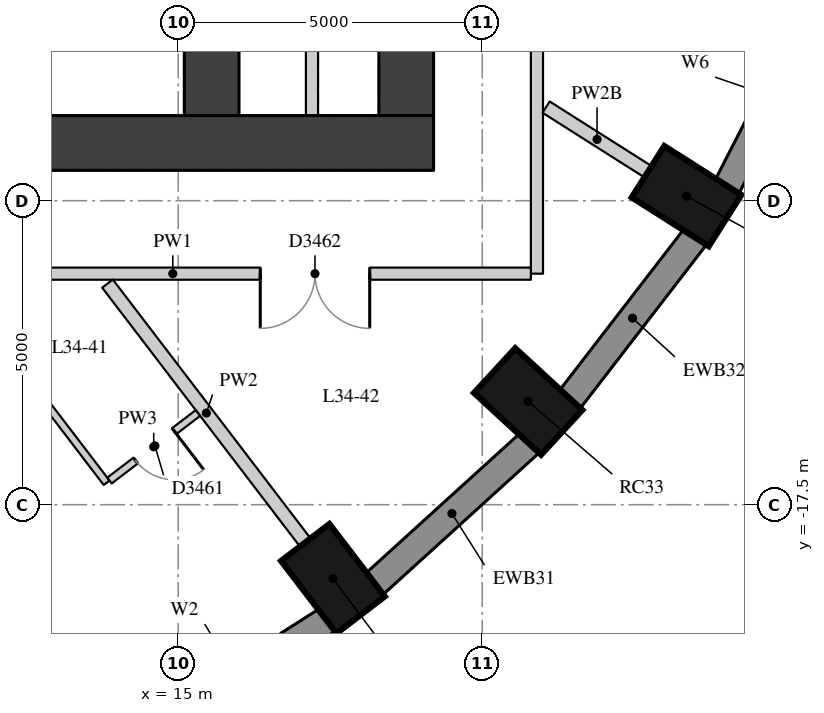
"""IFC4 building model, lengths in metres.
Left out: names, types, materials, properties, quantities, classifications, styles, units other than length and angle.
Written with IfcOpenShell. Run it as: python <this file> out.ifc"""

import sys

from ifc_helpers import new_model, si_unit, direction, frame, frame_2d, origin, origin_2d, place, context, subcontext, project, spatial, rectangle, extrude, element, fill, save


model = new_model("IFC4")
c1 = context("Model", 3, precision=1e-05, world=origin(), true_north=direction((0.0, 1.0)))
c2 = subcontext(c1, "Body", "Model", "MODEL_VIEW")
j1 = project(units=[si_unit("LENGTHUNIT", "METRE"), si_unit("PLANEANGLEUNIT", "RADIAN")], contexts=[c1])
p1 = place(None, origin())
s1 = spatial("IfcSite", under=j1, at=p1, CompositionType="ELEMENT")
p2 = place(p1, origin())
s2 = spatial("IfcBuilding", under=s1, at=p2, CompositionType="ELEMENT")
p3 = place(p2, frame((0.0, 0.0, 121.9)))
s3 = spatial("IfcBuildingStorey", under=s2, at=p3, CompositionType="ELEMENT", Elevation=121.9)
for number, where, z_axis, x_axis in (
    (1, (17.545, -18.717, 0.0), (0.0, 0.0, 1.0), (0.607, -0.795, 0.0)),
    (2, (20.755, -15.802, 0.0), (0.0, 0.0, 1.0), (0.735, -0.678, 0.0)),
    (3, (23.36, -12.425, 0.0), (0.0, 0.0, 1.0), (0.845, -0.536, 0.0)),
):
    element("IfcColumn", number, at=place(p3, frame(where, z_axis=z_axis, x_axis=x_axis)), inside=s3, PredefinedType="COLUMN", context=c2, shape_type="SweptSolid", body=[
        extrude(rectangle(XDim=1.5, YDim=1.0, at=origin_2d()), origin(), (0.0, 0.0, 1.0), 3.3),
    ])
p4 = place(p3, frame((14.475, -21.287, 0.0), z_axis=(0.0, 0.0, 1.0), x_axis=(0.843911841423, 0.536481876587, 0.0)))
e4 = element("IfcWall", 4, at=p4, inside=s3, PredefinedType="SOLIDWALL", context=c2, shape_type="SweptSolid", body=[
    extrude(rectangle(XDim=3.532, YDim=0.45, at=frame_2d((1.766, 0.0))), origin(), (0.0, 0.0, 1.0), 3.02),
])
p5 = place(p4, frame((0.766, 0.0, 0.4)))
e5 = element("IfcOpeningElement", 5, at=p5, cuts=e4, PredefinedType="OPENING", context=c2, shape_type="SweptSolid", body=[
    extrude(rectangle(XDim=2.0, YDim=1.75, at=frame_2d((1.0, 0.875))), frame((0.0, 0.235, 0.0), z_axis=(0.0, -1.0, 0.0), x_axis=(1.0, 0.0, 0.0)), (0.0, 0.0, 1.0), 0.47),
])
p6 = place(p3, frame((18.219, -18.81, 0.0), z_axis=(0.0, 0.0, 1.0), x_axis=(0.740364106106, 0.672206062446, 0.0)))
e6 = element("IfcWall", 6, at=p6, inside=s3, PredefinedType="SOLIDWALL", context=c2, shape_type="SweptSolid", body=[
    extrude(rectangle(XDim=3.464, YDim=0.45, at=frame_2d((1.732, 0.0))), origin(), (0.0, 0.0, 1.0), 3.02),
])
p7 = place(p3, frame((21.435, -15.775, 0.0), z_axis=(0.0, 0.0, 1.0), x_axis=(0.610693945156, 0.791866721961, 0.0)))
e7 = element("IfcWall", 7, at=p7, inside=s3, PredefinedType="SOLIDWALL", context=c2, shape_type="SweptSolid", body=[
    extrude(rectangle(XDim=3.395, YDim=0.45, at=frame_2d((1.697, 0.0))), origin(), (0.0, 0.0, 1.0), 3.02),
])
p8 = place(p3, frame((24.023, -12.277, 0.0), z_axis=(0.0, 0.0, 1.0), x_axis=(0.456828186229, 0.889554949549, 0.0)))
e8 = element("IfcWall", 8, at=p8, inside=s3, PredefinedType="SOLIDWALL", context=c2, shape_type="SweptSolid", body=[
    extrude(rectangle(XDim=3.333, YDim=0.45, at=frame_2d((1.667, 0.0))), origin(), (0.0, 0.0, 1.0), 3.02),
])
p9 = place(p8, frame((1.366, 0.0, 0.4)))
e9 = element("IfcOpeningElement", 9, at=p9, cuts=e8, PredefinedType="OPENING", context=c2, shape_type="SweptSolid", body=[
    extrude(rectangle(XDim=0.6, YDim=1.75, at=frame_2d((0.3, 0.875))), frame((0.0, 0.235, 0.0), z_axis=(0.0, -1.0, 0.0), x_axis=(1.0, 0.0, 0.0)), (0.0, 0.0, 1.0), 0.47),
])
p10 = place(p3, frame((18.75, -11.1, 0.0), z_axis=(0.0, 0.0, 1.0), x_axis=(0.0, 1.0, 0.0)))
e10 = element("IfcWall", 10, at=p10, inside=s3, PredefinedType="SHEAR", context=c2, shape_type="SweptSolid", body=[
    extrude(rectangle(XDim=22.2, YDim=0.9, at=frame_2d((11.1, 0.0))), origin(), (0.0, 0.0, 1.0), 3.02),
])
p11 = place(p10, frame((16.175, 0.0, 0.0)))
e11 = element("IfcOpeningElement", 11, at=p11, cuts=e10, PredefinedType="OPENING", context=c2, shape_type="SweptSolid", body=[
    extrude(rectangle(XDim=1.5, YDim=2.1, at=frame_2d((0.75, 1.05))), frame((0.0, 0.46, 0.0), z_axis=(0.0, -1.0, 0.0), x_axis=(1.0, 0.0, 0.0)), (0.0, 0.0, 1.0), 0.92),
])
p12 = place(p10, frame((5.025, 0.0, 0.0)))
e12 = element("IfcOpeningElement", 12, at=p12, cuts=e10, PredefinedType="OPENING", context=c2, shape_type="SweptSolid", body=[
    extrude(rectangle(XDim=1.5, YDim=2.1, at=frame_2d((0.75, 1.05))), frame((0.0, 0.46, 0.0), z_axis=(0.0, -1.0, 0.0), x_axis=(1.0, 0.0, 0.0)), (0.0, 0.0, 1.0), 0.92),
])
p13 = place(p3, frame((4.0, -11.55, 0.0), z_axis=(0.0, 0.0, 1.0), x_axis=(1.0, 0.0, 0.0)))
e13 = element("IfcWall", 13, at=p13, inside=s3, PredefinedType="SHEAR", context=c2, shape_type="SweptSolid", body=[
    extrude(rectangle(XDim=15.2, YDim=0.9, at=frame_2d((7.6, 0.0))), origin(), (0.0, 0.0, 1.0), 3.02),
])
p14 = place(p3, frame((15.55, -11.1, 0.0), z_axis=(0.0, 0.0, 1.0), x_axis=(0.0, 1.0, 0.0)))
e14 = element("IfcWall", 14, at=p14, inside=s3, PredefinedType="SHEAR", context=c2, shape_type="SweptSolid", body=[
    extrude(rectangle(XDim=22.2, YDim=0.9, at=frame_2d((11.1, 0.0))), origin(), (0.0, 0.0, 1.0), 3.02),
])
p15 = place(p14, frame((15.6, 0.0, 0.0)))
e15 = element("IfcOpeningElement", 15, at=p15, cuts=e14, PredefinedType="OPENING", context=c2, shape_type="SweptSolid", body=[
    extrude(rectangle(XDim=1.0, YDim=2.1, at=frame_2d((0.5, 1.05))), frame((0.0, 0.46, 0.0), z_axis=(0.0, -1.0, 0.0), x_axis=(1.0, 0.0, 0.0)), (0.0, 0.0, 1.0), 0.92),
])
p16 = place(p14, frame((5.6, 0.0, 0.0)))
e16 = element("IfcOpeningElement", 16, at=p16, cuts=e14, PredefinedType="OPENING", context=c2, shape_type="SweptSolid", body=[
    extrude(rectangle(XDim=1.0, YDim=2.1, at=frame_2d((0.5, 1.05))), frame((0.0, 0.46, 0.0), z_axis=(0.0, -1.0, 0.0), x_axis=(1.0, 0.0, 0.0)), (0.0, 0.0, 1.0), 0.92),
])
p17 = place(p3, frame((17.2, -11.1, 0.0), z_axis=(0.0, 0.0, 1.0), x_axis=(0.0, 1.0, 0.0)))
e17 = element("IfcWall", 17, at=p17, inside=s3, PredefinedType="PARTITIONING", context=c2, shape_type="SweptSolid", body=[
    extrude(rectangle(XDim=4.7, YDim=0.2, at=frame_2d((2.35, 0.0))), origin(), (0.0, 0.0, 1.0), 3.02),
])
p18 = place(p3, frame((20.9, 13.6, 0.0), z_axis=(0.0, 0.0, 1.0), x_axis=(0.0, -1.0, 0.0)))
e18 = element("IfcWall", 18, at=p18, inside=s3, PredefinedType="PARTITIONING", context=c2, shape_type="SweptSolid", body=[
    extrude(rectangle(XDim=27.3, YDim=0.2, at=frame_2d((13.65, 0.0))), origin(), (0.0, 0.0, 1.0), 3.02),
])
p19 = place(p18, frame((18.433, 0.0, 0.0)))
e19 = element("IfcOpeningElement", 19, at=p19, cuts=e18, PredefinedType="OPENING", context=c2, shape_type="SweptSolid", body=[
    extrude(rectangle(XDim=1.8, YDim=2.1, at=frame_2d((0.9, 1.05))), frame((0.0, 0.11, 0.0), z_axis=(0.0, -1.0, 0.0), x_axis=(1.0, 0.0, 0.0)), (0.0, 0.0, 1.0), 0.22),
])
p20 = place(p18, frame((8.167, 0.0, 0.0)))
e20 = element("IfcOpeningElement", 20, at=p20, cuts=e18, PredefinedType="OPENING", context=c2, shape_type="SweptSolid", body=[
    extrude(rectangle(XDim=1.8, YDim=2.1, at=frame_2d((0.9, 1.05))), frame((0.0, 0.11, 0.0), z_axis=(0.0, -1.0, 0.0), x_axis=(1.0, 0.0, 0.0)), (0.0, 0.0, 1.0), 0.22),
])
p21 = place(p3, frame((20.8, -13.7, 0.0), z_axis=(0.0, 0.0, 1.0), x_axis=(-1.0, 0.0, 0.0)))
e21 = element("IfcWall", 21, at=p21, inside=s3, PredefinedType="PARTITIONING", context=c2, shape_type="SweptSolid", body=[
    extrude(rectangle(XDim=11.778, YDim=0.2, at=frame_2d((5.889, 0.0))), origin(), (0.0, 0.0, 1.0), 3.02),
])
p22 = place(p21, frame((2.65, 0.0, 0.0)))
e22 = element("IfcOpeningElement", 22, at=p22, cuts=e21, PredefinedType="OPENING", context=c2, shape_type="SweptSolid", body=[
    extrude(rectangle(XDim=1.8, YDim=2.1, at=frame_2d((0.9, 1.05))), frame((0.0, 0.11, 0.0), z_axis=(0.0, -1.0, 0.0), x_axis=(1.0, 0.0, 0.0)), (0.0, 0.0, 1.0), 0.22),
])
p23 = place(p3, frame((17.089, -18.121, 0.0), z_axis=(0.0, 0.0, 1.0), x_axis=(-0.607049146133, 0.794664290238, 0.0)))
e23 = element("IfcWall", 23, at=p23, inside=s3, PredefinedType="PARTITIONING", context=c2, shape_type="SweptSolid", body=[
    extrude(rectangle(XDim=5.357, YDim=0.22, at=frame_2d((2.679, 0.0))), origin(), (0.0, 0.0, 1.0), 3.02),
])
p24 = place(p3, frame((22.727, -12.023, 0.0), z_axis=(0.0, 0.0, 1.0), x_axis=(-0.84453164716, 0.535505646044, 0.0)))
e24 = element("IfcWall", 24, at=p24, inside=s3, PredefinedType="PARTITIONING", context=c2, shape_type="SweptSolid", body=[
    extrude(rectangle(XDim=1.985, YDim=0.22, at=frame_2d((0.992, 0.0))), origin(), (0.0, 0.0, 1.0), 2.57),
])
p25 = place(p3, frame((11.296, -13.832, 0.0), z_axis=(0.0, 0.0, 1.0), x_axis=(0.607062475719, -0.794654107505, 0.0)))
e25 = element("IfcWall", 25, at=p25, inside=s3, PredefinedType="PARTITIONING", context=c2, shape_type="SweptSolid", body=[
    extrude(rectangle(XDim=4.162, YDim=0.12, at=frame_2d((2.081, 0.0))), origin(), (0.0, 0.0, 1.0), 3.02),
])
p26 = place(p3, frame((13.87, -17.103, 0.0), z_axis=(0.0, 0.0, 1.0), x_axis=(0.794637937609, 0.607083641776, 0.0)))
e26 = element("IfcWall", 26, at=p26, inside=s3, PredefinedType="PARTITIONING", context=c2, shape_type="SweptSolid", body=[
    extrude(rectangle(XDim=1.83, YDim=0.12, at=frame_2d((0.915, 0.0))), origin(), (0.0, 0.0, 1.0), 3.02),
])
p27 = place(p26, frame((0.54, 0.0, 0.0)))
e27 = element("IfcOpeningElement", 27, at=p27, cuts=e26, PredefinedType="OPENING", context=c2, shape_type="SweptSolid", body=[
    extrude(rectangle(XDim=0.8, YDim=2.1, at=frame_2d((0.4, 1.05))), frame((0.0, 0.07, 0.0), z_axis=(0.0, -1.0, 0.0), x_axis=(1.0, 0.0, 0.0)), (0.0, 0.0, 1.0), 0.14),
])
p28 = place(p27, origin())
e28 = element("IfcDoor", 28, at=p28, inside=s3, OperationType="SINGLE_SWING_LEFT", PredefinedType="DOOR", context=c2, shape_type="SweptSolid", body=[
    extrude(rectangle(XDim=0.8, YDim=2.1, at=frame_2d((0.4, 1.05))), frame((0.0, 0.025, 0.0), z_axis=(0.0, -1.0, 0.0), x_axis=(1.0, 0.0, 0.0)), (0.0, 0.0, 1.0), 0.05),
])
fill(e27, e28)
p29 = place(p22, origin())
e29 = element("IfcDoor", 29, at=p29, inside=s3, OperationType="DOUBLE_DOOR_SINGLE_SWING", PredefinedType="DOOR", context=c2, shape_type="SweptSolid", body=[
    extrude(rectangle(XDim=1.8, YDim=2.1, at=frame_2d((0.9, 1.05))), frame((0.0, 0.025, 0.0), z_axis=(0.0, -1.0, 0.0), x_axis=(1.0, 0.0, 0.0)), (0.0, 0.0, 1.0), 0.05),
])
fill(e22, e29)
save(model, sys.argv[1])
